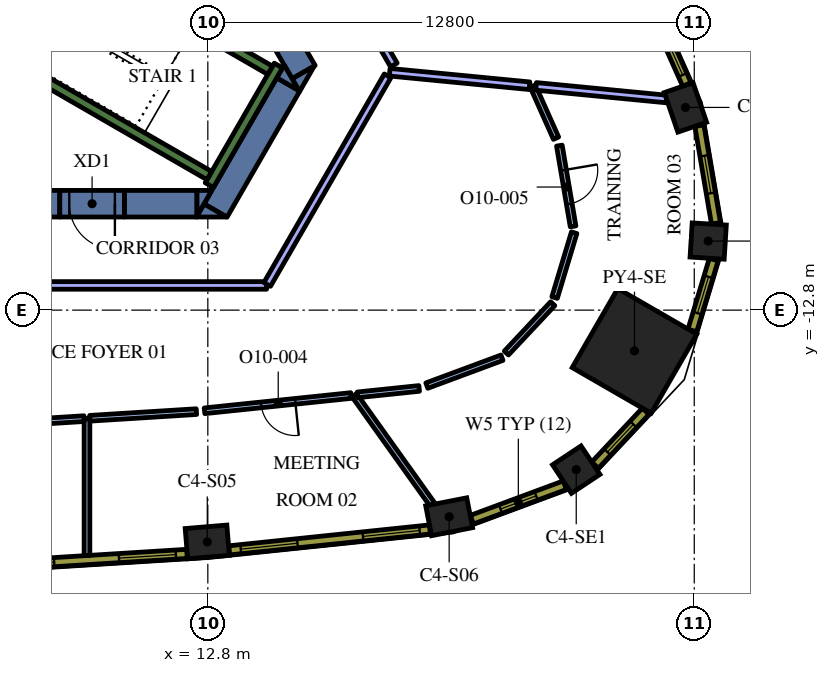
"""IFC4 building model, lengths in metres.
Left out: names, types, materials, properties, quantities, classifications, styles, units other than length and angle.
Written with IfcOpenShell. Run it as: python <this file> out.ifc"""

import sys

from ifc_helpers import new_model, si_unit, direction, frame, frame_2d, origin, origin_2d, place, context, subcontext, project, spatial, polyline, rectangle, outline, extrude, element, fill, save


model = new_model("IFC4")
c1 = context("Model", 3, precision=1e-05, world=origin(), true_north=direction((0.0, 1.0)))
c2 = subcontext(c1, "Body", "Model", "MODEL_VIEW")
j1 = project(units=[si_unit("LENGTHUNIT", "METRE"), si_unit("PLANEANGLEUNIT", "RADIAN")], contexts=[c1])
p1 = place(None, origin())
s1 = spatial("IfcSite", under=j1, at=p1, CompositionType="ELEMENT")
p2 = place(p1, origin())
s2 = spatial("IfcBuilding", under=s1, at=p2, CompositionType="ELEMENT")
p3 = place(p2, frame((0.0, 0.0, 252.0)))
s3 = spatial("IfcBuildingStorey", under=s2, at=p3, CompositionType="ELEMENT", Elevation=252.0)
p4 = place(p3, frame((24.027, -13.872, 0.0), z_axis=(0.0, 0.0, 1.0), x_axis=(0.866025403784, -0.5, 0.0)))
e1 = element("IfcColumn", 1, at=p4, inside=s3, PredefinedType="COLUMN", context=c2, shape_type="SweptSolid", body=[
    extrude(rectangle(XDim=2.4, YDim=2.4, at=origin_2d()), origin(), (0.0, 0.0, 1.0), 4.2),
])
for number, where, z_axis, x_axis in (
    (2, (12.785, -18.9, 0.0), (0.0, 0.0, 1.0), (0.997, 0.083, 0.0)),
    (3, (19.15, -18.237, 0.0), (0.0, 0.0, 1.0), (0.981, 0.192, 0.0)),
):
    element("IfcColumn", number, at=place(p3, frame(where, z_axis=z_axis, x_axis=x_axis)), inside=s3, PredefinedType="COLUMN", context=c2, shape_type="SweptSolid", body=[
        extrude(rectangle(XDim=1.1, YDim=0.8, at=origin_2d()), origin(), (0.0, 0.0, 1.0), 4.2),
    ])
for number, where, z_axis, x_axis in (
    (4, (22.494, -16.997, 0.0), (0.0, 0.0, 1.0), (0.833, 0.553, 0.0)),
    (5, (25.967, -10.982, 0.0), (0.0, 0.0, 1.0), (0.062, 0.998, 0.0)),
):
    element("IfcColumn", number, at=place(p3, frame(where, z_axis=z_axis, x_axis=x_axis)), inside=s3, PredefinedType="COLUMN", context=c2, shape_type="SweptSolid", body=[
        extrude(rectangle(XDim=0.9, YDim=0.9, at=origin_2d()), origin(), (0.0, 0.0, 1.0), 4.2),
    ])
p5 = place(p3, frame((25.369, -7.466, 0.0), z_axis=(0.0, 0.0, 1.0), x_axis=(-0.324074280638, 0.946031638281, 0.0)))
e6 = element("IfcColumn", 6, at=p5, inside=s3, PredefinedType="COLUMN", context=c2, shape_type="SweptSolid", body=[
    extrude(rectangle(XDim=1.1, YDim=0.8, at=origin_2d()), origin(), (0.0, 0.0, 1.0), 4.2),
])
p6 = place(p3, frame((9.085, 4.264, 0.0), z_axis=(0.0, 0.0, 1.0), x_axis=(0.499998082512, -0.866026510844, 0.0)))
e7 = element("IfcWall", 7, at=p6, inside=s3, PredefinedType="SOLIDWALL", context=c2, shape_type="SweptSolid", body=[
    extrude(rectangle(XDim=12.472, YDim=0.7, at=frame_2d((6.236, 0.0))), origin(), (0.0, 0.0, 1.0), 4.2),
])
p7 = place(p3, origin())
e8 = element("IfcWall", 8, at=p7, inside=s3, PredefinedType="SOLIDWALL", context=c2, shape_type="SweptSolid", body=[
    extrude(outline(polyline([(15.213, -7.05), (15.019, -6.714), (15.601, -6.378), (15.213, -7.05)])), origin(), (0.0, 0.0, 1.0), 4.2),
])
p8 = place(p3, frame((13.003, -10.179, 0.0), z_axis=(0.0, 0.0, 1.0), x_axis=(0.499972675833, 0.866041178825, 0.0)))
e9 = element("IfcWall", 9, at=p8, inside=s3, PredefinedType="SOLIDWALL", context=c2, shape_type="SweptSolid", body=[
    extrude(rectangle(XDim=3.829, YDim=0.7, at=frame_2d((1.915, 0.0))), origin(), (0.0, 0.0, 1.0), 4.2),
])
e10 = element("IfcWall", 10, at=p7, inside=s3, PredefinedType="SOLIDWALL", context=c2, shape_type="SweptSolid", body=[
    extrude(outline(polyline([(12.5, -10.35), (12.698, -10.005), (13.296, -10.35), (12.5, -10.35)])), origin(), (0.0, 0.0, 1.0), 4.2),
])
e11 = element("IfcWall", 11, at=p7, inside=s3, PredefinedType="SOLIDWALL", context=c2, shape_type="SweptSolid", body=[
    extrude(outline(polyline([(14.809, -6.35), (15.197, -7.022), (14.615, -6.686), (14.809, -6.35)])), origin(), (0.0, 0.0, 1.0), 4.2),
])
p9 = place(p3, frame((10.604, -10.0, 0.0), z_axis=(0.0, 0.0, 1.0), x_axis=(1.0, 0.0, 0.0)))
e12 = element("IfcWall", 12, at=p9, inside=s3, PredefinedType="SOLIDWALL", context=c2, shape_type="SweptSolid", body=[
    extrude(rectangle(XDim=1.909, YDim=0.7, at=frame_2d((0.955, 0.0))), origin(), (0.0, 0.0, 1.0), 4.2),
])
e13 = element("IfcWall", 13, at=p7, inside=s3, PredefinedType="SOLIDWALL", context=c2, shape_type="SweptSolid", body=[
    extrude(outline(polyline([(12.904, -9.65), (12.516, -10.322), (12.516, -9.65), (12.904, -9.65)])), origin(), (0.0, 0.0, 1.0), 4.2),
])
p10 = place(p3, frame((8.904, -10.0, 0.0), z_axis=(0.0, 0.0, 1.0), x_axis=(-1.0, 0.0, 0.0)))
e14 = element("IfcWall", 14, at=p10, inside=s3, PredefinedType="SOLIDWALL", context=c2, shape_type="SweptSolid", body=[
    extrude(rectangle(XDim=22.226, YDim=0.7, at=frame_2d((11.113, 0.0))), origin(), (0.0, 0.0, 1.0), 4.2),
])
p11 = place(p3, frame((12.84, -9.511, 0.0), z_axis=(0.0, 0.0, 1.0), x_axis=(0.500048121057, 0.865997619297, 0.0)))
e15 = element("IfcWall", 15, at=p11, inside=s3, PredefinedType="SOLIDWALL", context=c2, shape_type="SweptSolid", body=[
    extrude(rectangle(XDim=3.634, YDim=0.25, at=frame_2d((1.817, 0.0))), origin(), (0.0, 0.0, 1.0), 4.2),
])
p12 = place(p3, frame((12.84, -9.261, 0.0), z_axis=(0.0, 0.0, 1.0), x_axis=(-0.866013990052, 0.500019768644, 0.0)))
e16 = element("IfcWall", 16, at=p12, inside=s3, PredefinedType="SOLIDWALL", context=c2, shape_type="SweptSolid", body=[
    extrude(rectangle(XDim=6.8, YDim=0.25, at=frame_2d((3.4, 0.0))), origin(), (0.0, 0.0, 1.0), 4.2),
])
p13 = place(p3, frame((8.334, -2.964, 0.0), z_axis=(0.0, 0.0, 1.0), x_axis=(0.866016039709, -0.500016218704, 0.0)))
e17 = element("IfcWall", 17, at=p13, inside=s3, PredefinedType="SOLIDWALL", context=c2, shape_type="SweptSolid", body=[
    extrude(rectangle(XDim=7.05, YDim=0.25, at=frame_2d((3.525, 0.0))), origin(), (0.0, 0.0, 1.0), 4.2),
])
p14 = place(p3, frame((10.604, -10.0, 0.0), z_axis=(0.0, 0.0, 1.0), x_axis=(-1.0, 0.0, 0.0)))
e18 = element("IfcWall", 18, at=p14, inside=s3, PredefinedType="SOLIDWALL", context=c2, shape_type="SweptSolid", body=[
    extrude(rectangle(XDim=1.7, YDim=0.7, at=frame_2d((0.85, 0.0))), origin(), (0.0, 0.0, 1.0), 4.2),
])
p15 = place(p14, frame((0.25, 0.0, 0.0)))
e19 = element("IfcOpeningElement", 19, at=p15, cuts=e18, PredefinedType="OPENING", context=c2, shape_type="SweptSolid", body=[
    extrude(rectangle(XDim=1.2, YDim=2.1, at=frame_2d((0.6, 1.05))), frame((0.0, 0.36, 0.0), z_axis=(0.0, -1.0, 0.0), x_axis=(1.0, 0.0, 0.0)), (0.0, 0.0, 1.0), 0.72),
])
p16 = place(p3, frame((9.62, -15.65, 0.0), z_axis=(0.0, 0.0, 1.0), x_axis=(0.0, -1.0, 0.0)))
e20 = element("IfcWall", 20, at=p16, inside=s3, PredefinedType="PARTITIONING", context=c2, shape_type="SweptSolid", body=[
    extrude(rectangle(XDim=3.607, YDim=0.15, at=frame_2d((1.803, 0.0))), origin(), (0.0, 0.0, 1.0), 3.4),
])
p17 = place(p3, frame((6.469, -15.847, 0.0), z_axis=(0.0, 0.0, 1.0), x_axis=(0.998063968491, 0.062195777984, 0.0)))
e21 = element("IfcWall", 21, at=p17, inside=s3, PredefinedType="PARTITIONING", context=c2, shape_type="SweptSolid", body=[
    extrude(rectangle(XDim=3.081, YDim=0.15, at=frame_2d((1.541, 0.0))), origin(), (0.0, 0.0, 1.0), 3.4),
])
p18 = place(p3, frame((16.655, -15.038, 0.0), z_axis=(0.0, 0.0, 1.0), x_axis=(0.580996489012, -0.813906063226, 0.0)))
e22 = element("IfcWall", 22, at=p18, inside=s3, PredefinedType="PARTITIONING", context=c2, shape_type="SweptSolid", body=[
    extrude(rectangle(XDim=3.536, YDim=0.15, at=frame_2d((1.768, 0.0))), origin(), (0.0, 0.0, 1.0), 3.4),
])
p19 = place(p3, frame((9.695, -15.646, 0.0), z_axis=(0.0, 0.0, 1.0), x_axis=(0.998058994434, 0.062275545993, 0.0)))
e23 = element("IfcWall", 23, at=p19, inside=s3, PredefinedType="PARTITIONING", context=c2, shape_type="SweptSolid", body=[
    extrude(rectangle(XDim=2.811, YDim=0.15, at=frame_2d((1.405, 0.0))), origin(), (0.0, 0.0, 1.0), 3.4),
])
p20 = place(p3, frame((16.569, -15.047, 0.0), z_axis=(0.0, 0.0, 1.0), x_axis=(-0.994626247491, -0.103530806058, 0.0)))
e24 = element("IfcWall", 24, at=p20, inside=s3, PredefinedType="PARTITIONING", context=c2, shape_type="SweptSolid", body=[
    extrude(rectangle(XDim=3.877, YDim=0.15, at=frame_2d((1.938, 0.0))), origin(), (0.0, 0.0, 1.0), 3.4),
])
p21 = place(p20, frame((1.477, 0.0, 0.0)))
e25 = element("IfcOpeningElement", 25, at=p21, cuts=e24, PredefinedType="OPENING", context=c2, shape_type="SweptSolid", body=[
    extrude(rectangle(XDim=0.9, YDim=2.1, at=frame_2d((0.45, 1.05))), frame((0.0, 0.085, 0.0), z_axis=(0.0, -1.0, 0.0), x_axis=(1.0, 0.0, 0.0)), (0.0, 0.0, 1.0), 0.17),
])
p22 = place(p3, frame((16.74, -15.029, 0.0), z_axis=(0.0, 0.0, 1.0), x_axis=(0.994613262412, 0.103655478553, 0.0)))
e26 = element("IfcWall", 26, at=p22, inside=s3, PredefinedType="PARTITIONING", context=c2, shape_type="SweptSolid", body=[
    extrude(rectangle(XDim=1.63, YDim=0.15, at=frame_2d((0.815, 0.0))), origin(), (0.0, 0.0, 1.0), 3.4),
])
p23 = place(p3, frame((18.563, -14.786, 0.0), z_axis=(0.0, 0.0, 1.0), x_axis=(0.937574131487, 0.347785491312, 0.0)))
e27 = element("IfcWall", 27, at=p23, inside=s3, PredefinedType="PARTITIONING", context=c2, shape_type="SweptSolid", body=[
    extrude(rectangle(XDim=2.109, YDim=0.15, at=frame_2d((1.055, 0.0))), origin(), (0.0, 0.0, 1.0), 3.4),
])
for number, where, z_axis, x_axis in (
    (28, (20.656, -13.929, 0.0), (0.0, 0.0, 1.0), (0.685, 0.729, 0.0)),
    (29, (21.925, -12.469, 0.0), (0.0, 0.0, 1.0), (0.289, 0.957, 0.0)),
):
    element("IfcWall", number, at=place(p3, frame(where, z_axis=z_axis, x_axis=x_axis)), inside=s3, PredefinedType="PARTITIONING", context=c2, shape_type="SweptSolid", body=[
        extrude(rectangle(XDim=1.782, YDim=0.15, at=frame_2d((0.891, 0.0))), origin(), (0.0, 0.0, 1.0), 3.4),
    ])
p24 = place(p3, frame((22.05, -8.472, 0.0), z_axis=(0.0, 0.0, 1.0), x_axis=(0.167668164232, -0.985843489963, 0.0)))
e30 = element("IfcWall", 30, at=p24, inside=s3, PredefinedType="PARTITIONING", context=c2, shape_type="SweptSolid", body=[
    extrude(rectangle(XDim=2.155, YDim=0.15, at=frame_2d((1.078, 0.0))), origin(), (0.0, 0.0, 1.0), 3.4),
])
p25 = place(p24, frame((0.655, 0.0, 0.0)))
e31 = element("IfcOpeningElement", 31, at=p25, cuts=e30, PredefinedType="OPENING", context=c2, shape_type="SweptSolid", body=[
    extrude(rectangle(XDim=0.9, YDim=2.1, at=frame_2d((0.45, 1.05))), frame((0.0, 0.085, 0.0), z_axis=(0.0, -1.0, 0.0), x_axis=(1.0, 0.0, 0.0)), (0.0, 0.0, 1.0), 0.17),
])
p26 = place(p3, frame((21.963, -8.276, 0.0), z_axis=(0.0, 0.0, 1.0), x_axis=(-0.407570957072, 0.913173540436, 0.0)))
e32 = element("IfcWall", 32, at=p26, inside=s3, PredefinedType="PARTITIONING", context=c2, shape_type="SweptSolid", body=[
    extrude(rectangle(XDim=1.502, YDim=0.15, at=frame_2d((0.751, 0.0))), origin(), (0.0, 0.0, 1.0), 3.4),
])
p27 = place(p3, frame((21.437, -6.913, 0.0), z_axis=(0.0, 0.0, 1.0), x_axis=(0.995357015301, -0.096251816042, 0.0)))
e33 = element("IfcWall", 33, at=p27, inside=s3, PredefinedType="PARTITIONING", context=c2, shape_type="SweptSolid", body=[
    extrude(rectangle(XDim=3.45, YDim=0.2, at=frame_2d((1.725, 0.0))), origin(), (0.0, 0.0, 1.0), 3.4),
])
p28 = place(p3, frame((17.586, -6.54, 0.0), z_axis=(0.0, 0.0, 1.0), x_axis=(0.995358181524, -0.096239755158, 0.0)))
e34 = element("IfcWall", 34, at=p28, inside=s3, PredefinedType="PARTITIONING", context=c2, shape_type="SweptSolid", body=[
    extrude(rectangle(XDim=3.696, YDim=0.2, at=frame_2d((1.848, 0.0))), origin(), (0.0, 0.0, 1.0), 3.4),
])
p29 = place(p3, frame((6.03, -12.15, 0.0), z_axis=(0.0, 0.0, 1.0), x_axis=(1.0, 0.0, 0.0)))
e35 = element("IfcWall", 35, at=p29, inside=s3, PredefinedType="PARTITIONING", context=c2, shape_type="SweptSolid", body=[
    extrude(rectangle(XDim=8.317, YDim=0.2, at=frame_2d((4.159, 0.0))), origin(), (0.0, 0.0, 1.0), 3.4),
])
p30 = place(p3, frame((14.362, -12.124, 0.0), z_axis=(0.0, 0.0, 1.0), x_axis=(0.500017005442, 0.866015585465, 0.0)))
e36 = element("IfcWall", 36, at=p30, inside=s3, PredefinedType="PARTITIONING", context=c2, shape_type="SweptSolid", body=[
    extrude(rectangle(XDim=6.338, YDim=0.2, at=frame_2d((3.169, 0.0))), origin(), (0.0, 0.0, 1.0), 3.4),
])
p31 = place(p3, frame((17.696, -6.35, 0.0), z_axis=(0.0, 0.0, 1.0), x_axis=(-0.500009576767, 0.866019874565, 0.0)))
e37 = element("IfcWall", 37, at=p31, inside=s3, PredefinedType="PARTITIONING", context=c2, shape_type="SweptSolid", body=[
    extrude(rectangle(XDim=8.317, YDim=0.2, at=frame_2d((4.159, 0.0))), origin(), (0.0, 0.0, 1.0), 3.4),
])
p32 = place(p31, frame((3.3, 0.0, 0.0)))
e38 = element("IfcOpeningElement", 38, at=p32, cuts=e37, PredefinedType="OPENING", context=c2, shape_type="SweptSolid", body=[
    extrude(rectangle(XDim=1.8, YDim=2.1, at=frame_2d((0.9, 1.05))), frame((0.0, 0.11, 0.0), z_axis=(0.0, -1.0, 0.0), x_axis=(1.0, 0.0, 0.0)), (0.0, 0.0, 1.0), 0.22),
])
p33 = place(p3, frame((6.965, -19.543, 0.0), z_axis=(0.0, 0.0, 1.0), x_axis=(0.9980633213, 0.062206162685, 0.0)))
e39 = element("IfcWall", 39, at=p33, inside=s3, PredefinedType="SOLIDWALL", context=c2, shape_type="SweptSolid", body=[
    extrude(rectangle(XDim=5.298, YDim=0.24, at=frame_2d((2.649, 0.0))), origin(), (0.0, 0.0, 1.0), 3.9),
])
p34 = place(p33, frame((0.295, 0.0, 0.9)))
e40 = element("IfcOpeningElement", 40, at=p34, cuts=e39, PredefinedType="OPENING", context=c2, shape_type="SweptSolid", body=[
    extrude(rectangle(XDim=1.5, YDim=2.55, at=frame_2d((0.75, 1.275))), frame((0.0, 0.13, 0.0), z_axis=(0.0, -1.0, 0.0), x_axis=(1.0, 0.0, 0.0)), (0.0, 0.0, 1.0), 0.26),
])
p35 = place(p33, frame((3.504, 0.0, 0.9)))
e41 = element("IfcOpeningElement", 41, at=p35, cuts=e39, PredefinedType="OPENING", context=c2, shape_type="SweptSolid", body=[
    extrude(rectangle(XDim=1.5, YDim=2.55, at=frame_2d((0.75, 1.275))), frame((0.0, 0.13, 0.0), z_axis=(0.0, -1.0, 0.0), x_axis=(1.0, 0.0, 0.0)), (0.0, 0.0, 1.0), 0.26),
])
p36 = place(p3, frame((13.362, -19.121, 0.0), z_axis=(0.0, 0.0, 1.0), x_axis=(0.994621961215, 0.103571976272, 0.0)))
e42 = element("IfcWall", 42, at=p36, inside=s3, PredefinedType="SOLIDWALL", context=c2, shape_type="SweptSolid", body=[
    extrude(rectangle(XDim=5.311, YDim=0.24, at=frame_2d((2.655, 0.0))), origin(), (0.0, 0.0, 1.0), 3.9),
])
p37 = place(p36, frame((0.306, 0.0, 0.9)))
e43 = element("IfcOpeningElement", 43, at=p37, cuts=e42, PredefinedType="OPENING", context=c2, shape_type="SweptSolid", body=[
    extrude(rectangle(XDim=1.5, YDim=2.55, at=frame_2d((0.75, 1.275))), frame((0.0, 0.13, 0.0), z_axis=(0.0, -1.0, 0.0), x_axis=(1.0, 0.0, 0.0)), (0.0, 0.0, 1.0), 0.26),
])
p38 = place(p36, frame((3.539, 0.0, 0.9)))
e44 = element("IfcOpeningElement", 44, at=p38, cuts=e42, PredefinedType="OPENING", context=c2, shape_type="SweptSolid", body=[
    extrude(rectangle(XDim=1.5, YDim=2.55, at=frame_2d((0.75, 1.275))), frame((0.0, 0.13, 0.0), z_axis=(0.0, -1.0, 0.0), x_axis=(1.0, 0.0, 0.0)), (0.0, 0.0, 1.0), 0.26),
])
p39 = place(p3, frame((19.748, -18.314, 0.0), z_axis=(0.0, 0.0, 1.0), x_axis=(0.937569171184, 0.347798863203, 0.0)))
e45 = element("IfcWall", 45, at=p39, inside=s3, PredefinedType="SOLIDWALL", context=c2, shape_type="SweptSolid", body=[
    extrude(rectangle(XDim=2.609, YDim=0.24, at=frame_2d((1.305, 0.0))), origin(), (0.0, 0.0, 1.0), 3.9),
])
p40 = place(p39, frame((0.805, 0.0, 0.9)))
e46 = element("IfcOpeningElement", 46, at=p40, cuts=e45, PredefinedType="OPENING", context=c2, shape_type="SweptSolid", body=[
    extrude(rectangle(XDim=1.0, YDim=2.55, at=frame_2d((0.5, 1.275))), frame((0.0, 0.13, 0.0), z_axis=(0.0, -1.0, 0.0), x_axis=(1.0, 0.0, 0.0)), (0.0, 0.0, 1.0), 0.26),
])
p41 = place(p3, frame((22.989, -16.879, 0.0), z_axis=(0.0, 0.0, 1.0), x_axis=(0.684770274166, 0.728758994194, 0.0)))
e47 = element("IfcWall", 47, at=p41, inside=s3, PredefinedType="SOLIDWALL", context=c2, shape_type="SweptSolid", body=[
    extrude(rectangle(XDim=1.948, YDim=0.24, at=frame_2d((0.974, 0.0))), origin(), (0.0, 0.0, 1.0), 3.9),
])
p42 = place(p41, frame((0.474, 0.0, 0.9)))
e48 = element("IfcOpeningElement", 48, at=p42, cuts=e47, PredefinedType="OPENING", context=c2, shape_type="SweptSolid", body=[
    extrude(rectangle(XDim=1.0, YDim=2.55, at=frame_2d((0.5, 1.275))), frame((0.0, 0.13, 0.0), z_axis=(0.0, -1.0, 0.0), x_axis=(1.0, 0.0, 0.0)), (0.0, 0.0, 1.0), 0.26),
])
p43 = place(p3, frame((25.55, -13.335, 0.0), z_axis=(0.0, 0.0, 1.0), x_axis=(0.288727209095, 0.957411405159, 0.0)))
e49 = element("IfcWall", 49, at=p43, inside=s3, PredefinedType="SOLIDWALL", context=c2, shape_type="SweptSolid", body=[
    extrude(rectangle(XDim=1.948, YDim=0.24, at=frame_2d((0.974, 0.0))), origin(), (0.0, 0.0, 1.0), 3.9),
])
p44 = place(p43, frame((0.474, 0.0, 0.9)))
e50 = element("IfcOpeningElement", 50, at=p44, cuts=e49, PredefinedType="OPENING", context=c2, shape_type="SweptSolid", body=[
    extrude(rectangle(XDim=1.0, YDim=2.55, at=frame_2d((0.5, 1.275))), frame((0.0, 0.13, 0.0), z_axis=(0.0, -1.0, 0.0), x_axis=(1.0, 0.0, 0.0)), (0.0, 0.0, 1.0), 0.26),
])
p45 = place(p3, frame((26.172, -10.517, 0.0), z_axis=(0.0, 0.0, 1.0), x_axis=(-0.167660055546, 0.985844869021, 0.0)))
e51 = element("IfcWall", 51, at=p45, inside=s3, PredefinedType="SOLIDWALL", context=c2, shape_type="SweptSolid", body=[
    extrude(rectangle(XDim=2.609, YDim=0.24, at=frame_2d((1.305, 0.0))), origin(), (0.0, 0.0, 1.0), 3.9),
])
p46 = place(p45, frame((0.805, 0.0, 0.9)))
e52 = element("IfcOpeningElement", 52, at=p46, cuts=e51, PredefinedType="OPENING", context=c2, shape_type="SweptSolid", body=[
    extrude(rectangle(XDim=1.0, YDim=2.55, at=frame_2d((0.5, 1.275))), frame((0.0, 0.13, 0.0), z_axis=(0.0, -1.0, 0.0), x_axis=(1.0, 0.0, 0.0)), (0.0, 0.0, 1.0), 0.26),
])
p47 = place(p3, frame((25.405, -6.861, 0.0), z_axis=(0.0, 0.0, 1.0), x_axis=(-0.407579651789, 0.913169659728, 0.0)))
e53 = element("IfcWall", 53, at=p47, inside=s3, PredefinedType="SOLIDWALL", context=c2, shape_type="SweptSolid", body=[
    extrude(rectangle(XDim=5.311, YDim=0.24, at=frame_2d((2.655, 0.0))), origin(), (0.0, 0.0, 1.0), 3.9),
])
p48 = place(p47, frame((0.271, 0.0, 0.9)))
e54 = element("IfcOpeningElement", 54, at=p48, cuts=e53, PredefinedType="OPENING", context=c2, shape_type="SweptSolid", body=[
    extrude(rectangle(XDim=1.5, YDim=2.55, at=frame_2d((0.75, 1.275))), frame((0.0, 0.13, 0.0), z_axis=(0.0, -1.0, 0.0), x_axis=(1.0, 0.0, 0.0)), (0.0, 0.0, 1.0), 0.26),
])
p49 = place(p47, frame((3.504, 0.0, 0.9)))
e55 = element("IfcOpeningElement", 55, at=p49, cuts=e53, PredefinedType="OPENING", context=c2, shape_type="SweptSolid", body=[
    extrude(rectangle(XDim=1.5, YDim=2.55, at=frame_2d((0.75, 1.275))), frame((0.0, 0.13, 0.0), z_axis=(0.0, -1.0, 0.0), x_axis=(1.0, 0.0, 0.0)), (0.0, 0.0, 1.0), 0.26),
])
p50 = place(p15, origin())
e56 = element("IfcDoor", 56, at=p50, inside=s3, OperationType="SINGLE_SWING_LEFT", PredefinedType="DOOR", context=c2, shape_type="SweptSolid", body=[
    extrude(rectangle(XDim=1.2, YDim=2.1, at=frame_2d((0.6, 1.05))), frame((0.0, 0.025, 0.0), z_axis=(0.0, -1.0, 0.0), x_axis=(1.0, 0.0, 0.0)), (0.0, 0.0, 1.0), 0.05),
])
fill(e19, e56)
p51 = place(p21, origin())
e57 = element("IfcDoor", 57, at=p51, inside=s3, OperationType="SINGLE_SWING_LEFT", PredefinedType="DOOR", context=c2, shape_type="SweptSolid", body=[
    extrude(rectangle(XDim=0.9, YDim=2.1, at=frame_2d((0.45, 1.05))), frame((0.0, 0.025, 0.0), z_axis=(0.0, -1.0, 0.0), x_axis=(1.0, 0.0, 0.0)), (0.0, 0.0, 1.0), 0.05),
])
fill(e25, e57)
p52 = place(p25, origin())
e58 = element("IfcDoor", 58, at=p52, inside=s3, OperationType="SINGLE_SWING_RIGHT", PredefinedType="DOOR", context=c2, shape_type="SweptSolid", body=[
    extrude(rectangle(XDim=0.9, YDim=2.1, at=frame_2d((0.45, 1.05))), frame((0.0, 0.025, 0.0), z_axis=(0.0, -1.0, 0.0), x_axis=(1.0, 0.0, 0.0)), (0.0, 0.0, 1.0), 0.05),
])
fill(e31, e58)
p53 = place(p34, origin())
e59 = element("IfcWindow", 59, at=p53, inside=s3, PartitioningType="SINGLE_PANEL", PredefinedType="WINDOW", context=c2, shape_type="SweptSolid", body=[
    extrude(rectangle(XDim=1.5, YDim=2.55, at=frame_2d((0.75, 1.275))), frame((0.0, 0.04, 0.0), z_axis=(0.0, -1.0, 0.0), x_axis=(1.0, 0.0, 0.0)), (0.0, 0.0, 1.0), 0.06),
])
fill(e40, e59)
p54 = place(p35, origin())
e60 = element("IfcWindow", 60, at=p54, inside=s3, PartitioningType="SINGLE_PANEL", PredefinedType="WINDOW", context=c2, shape_type="SweptSolid", body=[
    extrude(rectangle(XDim=1.5, YDim=2.55, at=frame_2d((0.75, 1.275))), frame((0.0, 0.04, 0.0), z_axis=(0.0, -1.0, 0.0), x_axis=(1.0, 0.0, 0.0)), (0.0, 0.0, 1.0), 0.06),
])
fill(e41, e60)
p55 = place(p37, origin())
e61 = element("IfcWindow", 61, at=p55, inside=s3, PartitioningType="SINGLE_PANEL", PredefinedType="WINDOW", context=c2, shape_type="SweptSolid", body=[
    extrude(rectangle(XDim=1.5, YDim=2.55, at=frame_2d((0.75, 1.275))), frame((0.0, 0.04, 0.0), z_axis=(0.0, -1.0, 0.0), x_axis=(1.0, 0.0, 0.0)), (0.0, 0.0, 1.0), 0.06),
])
fill(e43, e61)
p56 = place(p38, origin())
e62 = element("IfcWindow", 62, at=p56, inside=s3, PartitioningType="SINGLE_PANEL", PredefinedType="WINDOW", context=c2, shape_type="SweptSolid", body=[
    extrude(rectangle(XDim=1.5, YDim=2.55, at=frame_2d((0.75, 1.275))), frame((0.0, 0.04, 0.0), z_axis=(0.0, -1.0, 0.0), x_axis=(1.0, 0.0, 0.0)), (0.0, 0.0, 1.0), 0.06),
])
fill(e44, e62)
p57 = place(p40, origin())
e63 = element("IfcWindow", 63, at=p57, inside=s3, PartitioningType="SINGLE_PANEL", PredefinedType="WINDOW", context=c2, shape_type="SweptSolid", body=[
    extrude(rectangle(XDim=1.0, YDim=2.55, at=frame_2d((0.5, 1.275))), frame((0.0, 0.04, 0.0), z_axis=(0.0, -1.0, 0.0), x_axis=(1.0, 0.0, 0.0)), (0.0, 0.0, 1.0), 0.06),
])
fill(e46, e63)
p58 = place(p42, origin())
e64 = element("IfcWindow", 64, at=p58, inside=s3, PartitioningType="SINGLE_PANEL", PredefinedType="WINDOW", context=c2, shape_type="SweptSolid", body=[
    extrude(rectangle(XDim=1.0, YDim=2.55, at=frame_2d((0.5, 1.275))), frame((0.0, 0.04, 0.0), z_axis=(0.0, -1.0, 0.0), x_axis=(1.0, 0.0, 0.0)), (0.0, 0.0, 1.0), 0.06),
])
fill(e48, e64)
p59 = place(p44, origin())
e65 = element("IfcWindow", 65, at=p59, inside=s3, PartitioningType="SINGLE_PANEL", PredefinedType="WINDOW", context=c2, shape_type="SweptSolid", body=[
    extrude(rectangle(XDim=1.0, YDim=2.55, at=frame_2d((0.5, 1.275))), frame((0.0, 0.04, 0.0), z_axis=(0.0, -1.0, 0.0), x_axis=(1.0, 0.0, 0.0)), (0.0, 0.0, 1.0), 0.06),
])
fill(e50, e65)
p60 = place(p46, origin())
e66 = element("IfcWindow", 66, at=p60, inside=s3, PartitioningType="SINGLE_PANEL", PredefinedType="WINDOW", context=c2, shape_type="SweptSolid", body=[
    extrude(rectangle(XDim=1.0, YDim=2.55, at=frame_2d((0.5, 1.275))), frame((0.0, 0.04, 0.0), z_axis=(0.0, -1.0, 0.0), x_axis=(1.0, 0.0, 0.0)), (0.0, 0.0, 1.0), 0.06),
])
fill(e52, e66)
p61 = place(p48, origin())
e67 = element("IfcWindow", 67, at=p61, inside=s3, PartitioningType="SINGLE_PANEL", PredefinedType="WINDOW", context=c2, shape_type="SweptSolid", body=[
    extrude(rectangle(XDim=1.5, YDim=2.55, at=frame_2d((0.75, 1.275))), frame((0.0, 0.04, 0.0), z_axis=(0.0, -1.0, 0.0), x_axis=(1.0, 0.0, 0.0)), (0.0, 0.0, 1.0), 0.06),
])
fill(e54, e67)
save(model, sys.argv[1])
